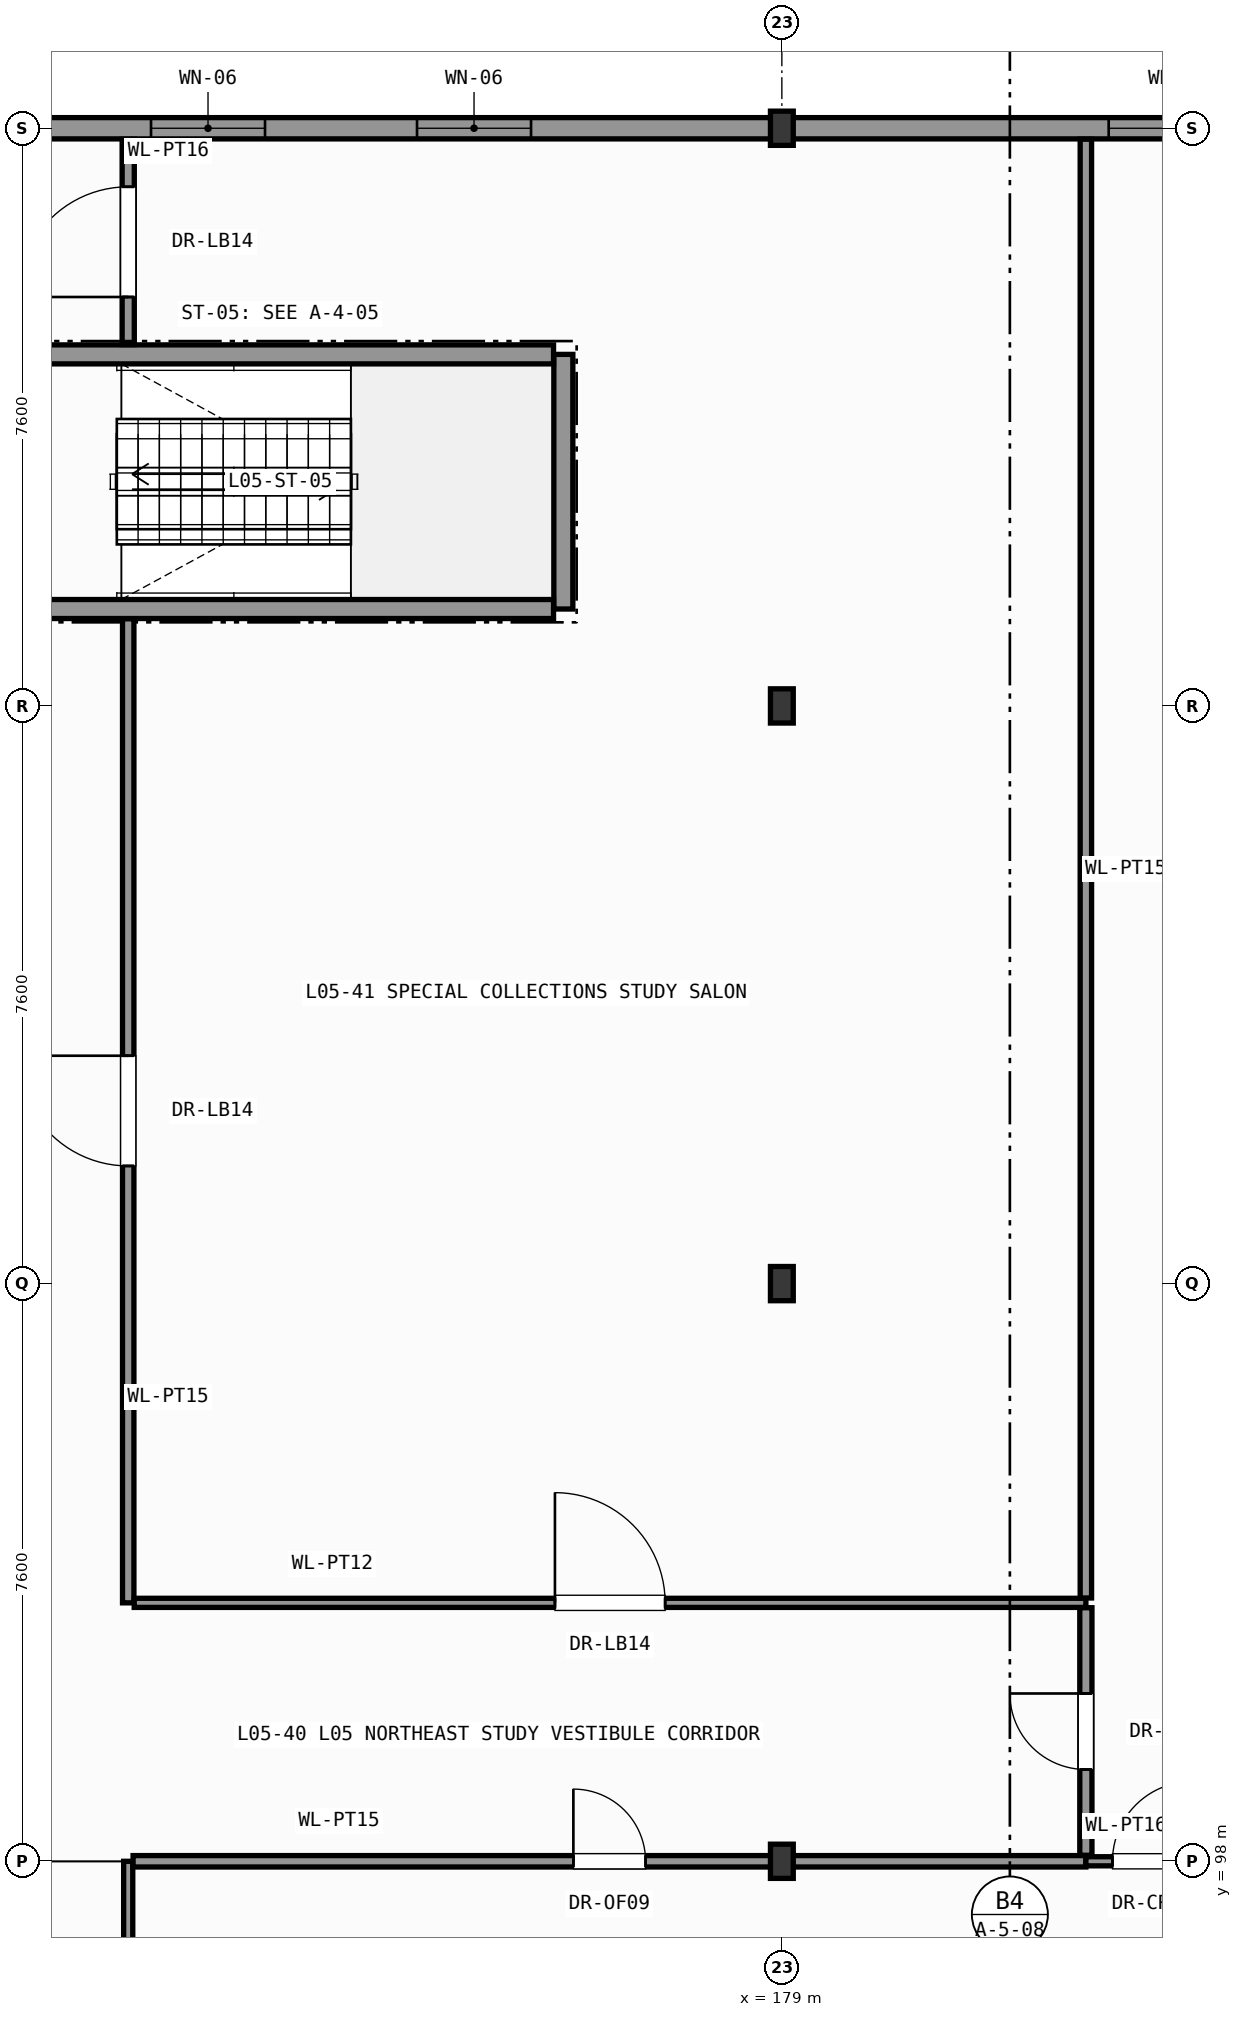
"""IFC4 building model, lengths in metres.
Left out: names, types, materials, properties, quantities, classifications, styles, units other than length and angle.
Written with IfcOpenShell. Run it as: python <this file> out.ifc"""

import sys

from ifc_helpers import new_model, si_unit, direction, frame, frame_2d, origin, origin_2d, place, context, subcontext, project, spatial, rectangle, i_section, extrude, element, fill, save


model = new_model("IFC4")
c1 = context("Model", 3, precision=1e-05, world=origin(), true_north=direction((0.0, 1.0)))
c2 = subcontext(c1, "Body", "Model", "MODEL_VIEW")
j1 = project(units=[si_unit("LENGTHUNIT", "METRE"), si_unit("PLANEANGLEUNIT", "RADIAN")], contexts=[c1])
p1 = place(None, origin())
s1 = spatial("IfcSite", under=j1, at=p1, CompositionType="ELEMENT")
p2 = place(p1, origin())
s2 = spatial("IfcBuilding", under=s1, at=p2, CompositionType="ELEMENT")
p3 = place(p2, frame((0.0, 0.0, 22.2)))
s3 = spatial("IfcBuildingStorey", under=s2, at=p3, CompositionType="ELEMENT", Elevation=22.2)
for number, where, z_axis, x_axis in (
    (1, (179.0, 98.0, 0.0), (0.0, 0.0, 1.0), (1.0, 0.0, 0.0)),
    (2, (179.0, 105.6, 0.0), (0.0, 0.0, 1.0), (1.0, 0.0, 0.0)),
    (3, (179.0, 113.2, 0.0), (0.0, 0.0, 1.0), (1.0, 0.0, 0.0)),
    (4, (179.0, 120.8, 0.0), (0.0, 0.0, 1.0), (1.0, 0.0, 0.0)),
):
    element("IfcColumn", number, at=place(p3, frame(where, z_axis=z_axis, x_axis=x_axis)), inside=s3, PredefinedType="COLUMN", context=c2, shape_type="SweptSolid", body=[
        extrude(i_section(OverallWidth=0.3, OverallDepth=0.45, WebThickness=0.014, FlangeThickness=0.026, FilletRadius=0.027, at=origin_2d()), origin(), (0.0, 0.0, 1.0), 4.2),
    ])
p4 = place(p3, frame((179.0, 120.8, 0.0), z_axis=(0.0, 0.0, 1.0), x_axis=(1.0, 0.0, 0.0)))
e5 = element("IfcWall", 5, at=p4, inside=s3, PredefinedType="SOLIDWALL", context=c2, shape_type="SweptSolid", body=[
    extrude(rectangle(XDim=12.966, YDim=0.28, at=frame_2d((6.483, 0.0))), origin(), (0.0, 0.0, 1.0), 3.415),
])
p5 = place(p4, frame((4.3, 0.0, 0.95)))
e6 = element("IfcOpeningElement", 6, at=p5, cuts=e5, PredefinedType="OPENING", context=c2, shape_type="SweptSolid", body=[
    extrude(rectangle(XDim=1.8, YDim=2.06, at=frame_2d((0.9, 1.03))), frame((0.0, 0.15, 0.0), z_axis=(0.0, -1.0, 0.0), x_axis=(1.0, 0.0, 0.0)), (0.0, 0.0, 1.0), 0.3),
])
p6 = place(p4, frame((7.7, 0.0, 0.95)))
e7 = element("IfcOpeningElement", 7, at=p6, cuts=e5, PredefinedType="OPENING", context=c2, shape_type="SweptSolid", body=[
    extrude(rectangle(XDim=1.8, YDim=2.06, at=frame_2d((0.9, 1.03))), frame((0.0, 0.15, 0.0), z_axis=(0.0, -1.0, 0.0), x_axis=(1.0, 0.0, 0.0)), (0.0, 0.0, 1.0), 0.3),
])
p7 = place(p3, frame((167.0, 120.8, 0.0), z_axis=(0.0, 0.0, 1.0), x_axis=(1.0, 0.0, 0.0)))
e8 = element("IfcWall", 8, at=p7, inside=s3, PredefinedType="SOLIDWALL", context=c2, shape_type="SweptSolid", body=[
    extrude(rectangle(XDim=12.0, YDim=0.28, at=frame_2d((6.0, 0.0))), origin(), (0.0, 0.0, 1.0), 3.415),
])
p8 = place(p7, frame((3.7, 0.0, 0.95)))
e9 = element("IfcOpeningElement", 9, at=p8, cuts=e8, PredefinedType="OPENING", context=c2, shape_type="SweptSolid", body=[
    extrude(rectangle(XDim=1.5, YDim=2.06, at=frame_2d((0.75, 1.03))), frame((0.0, 0.15, 0.0), z_axis=(0.0, -1.0, 0.0), x_axis=(1.0, 0.0, 0.0)), (0.0, 0.0, 1.0), 0.3),
])
p9 = place(p7, frame((7.2, 0.0, 0.95)))
e10 = element("IfcOpeningElement", 10, at=p9, cuts=e8, PredefinedType="OPENING", context=c2, shape_type="SweptSolid", body=[
    extrude(rectangle(XDim=1.5, YDim=2.06, at=frame_2d((0.75, 1.03))), frame((0.0, 0.15, 0.0), z_axis=(0.0, -1.0, 0.0), x_axis=(1.0, 0.0, 0.0)), (0.0, 0.0, 1.0), 0.3),
])
p10 = place(p3, frame((176.125, 114.475, 0.0), z_axis=(0.0, 0.0, 1.0), x_axis=(0.0, 1.0, 0.0)))
e11 = element("IfcWall", 11, at=p10, inside=s3, PredefinedType="SHEAR", context=c2, shape_type="SweptSolid", body=[
    extrude(rectangle(XDim=3.35, YDim=0.25, at=frame_2d((1.675, 0.0))), origin(), (0.0, 0.0, 1.0), 3.98),
])
for number, where, z_axis, x_axis in (
    (12, (168.804, 114.475, 0.0), (0.0, 0.0, 1.0), (1.0, 0.0, 0.0)),
    (13, (168.804, 117.825, 0.0), (0.0, 0.0, 1.0), (1.0, 0.0, 0.0)),
):
    element("IfcWall", number, at=place(p3, frame(where, z_axis=z_axis, x_axis=x_axis)), inside=s3, PredefinedType="SHEAR", context=c2, shape_type="SweptSolid", body=[
        extrude(rectangle(XDim=7.192, YDim=0.25, at=frame_2d((3.596, 0.0))), origin(), (0.0, 0.0, 1.0), 3.98),
    ])
p11 = place(p3, frame((170.4, 86.879, 0.0), z_axis=(0.0, 0.0, 1.0), x_axis=(0.0, 1.0, 0.0)))
e14 = element("IfcWall", 14, at=p11, inside=s3, PredefinedType="PARTITIONING", context=c2, shape_type="SweptSolid", body=[
    extrude(rectangle(XDim=11.121, YDim=0.12, at=frame_2d((5.561, 0.0))), origin(), (0.0, 0.0, 1.0), 3.98),
])
p12 = place(p11, frame((5.035, 0.0, 0.0)))
e15 = element("IfcOpeningElement", 15, at=p12, cuts=e14, PredefinedType="OPENING", context=c2, shape_type="SweptSolid", body=[
    extrude(rectangle(XDim=1.05, YDim=2.2, at=frame_2d((0.525, 1.1))), frame((0.0, 0.07, 0.0), z_axis=(0.0, -1.0, 0.0), x_axis=(1.0, 0.0, 0.0)), (0.0, 0.0, 1.0), 0.14),
])
p13 = place(p3, frame((170.464, 98.0, 0.0), z_axis=(0.0, 0.0, 1.0), x_axis=(1.0, 0.0, 0.0)))
e16 = element("IfcWall", 16, at=p13, inside=s3, PredefinedType="PARTITIONING", context=c2, shape_type="SweptSolid", body=[
    extrude(rectangle(XDim=12.536, YDim=0.15, at=frame_2d((6.268, 0.0))), origin(), (0.0, 0.0, 1.0), 3.415),
])
p14 = place(p13, frame((5.793, 0.0, 0.0)))
e17 = element("IfcOpeningElement", 17, at=p14, cuts=e16, PredefinedType="OPENING", context=c2, shape_type="SweptSolid", body=[
    extrude(rectangle(XDim=0.95, YDim=2.1, at=frame_2d((0.475, 1.05))), frame((0.0, 0.085, 0.0), z_axis=(0.0, -1.0, 0.0), x_axis=(1.0, 0.0, 0.0)), (0.0, 0.0, 1.0), 0.17),
])
p15 = place(p3, frame((183.0, 98.0, 0.0), z_axis=(0.0, 0.0, 1.0), x_axis=(1.0, 0.0, 0.0)))
e18 = element("IfcWall", 18, at=p15, inside=s3, PredefinedType="PARTITIONING", context=c2, shape_type="SweptSolid", body=[
    extrude(rectangle(XDim=14.821, YDim=0.12, at=frame_2d((7.411, 0.0))), origin(), (0.0, 0.0, 1.0), 3.315),
])
p16 = place(p15, frame((0.35, 0.0, 0.0)))
e19 = element("IfcOpeningElement", 19, at=p16, cuts=e18, PredefinedType="OPENING", context=c2, shape_type="SweptSolid", body=[
    extrude(rectangle(XDim=1.05, YDim=2.2, at=frame_2d((0.525, 1.1))), frame((0.0, 0.07, 0.0), z_axis=(0.0, -1.0, 0.0), x_axis=(1.0, 0.0, 0.0)), (0.0, 0.0, 1.0), 0.14),
])
p17 = place(p3, frame((170.4, 117.954, 0.0), z_axis=(0.0, 0.0, 1.0), x_axis=(0.0, 1.0, 0.0)))
e20 = element("IfcWall", 20, at=p17, inside=s3, PredefinedType="PARTITIONING", context=c2, shape_type="SweptSolid", body=[
    extrude(rectangle(XDim=2.702, YDim=0.16, at=frame_2d((1.351, 0.0))), origin(), (0.0, 0.0, 1.0), 3.98),
])
p18 = place(p17, frame((0.626, 0.0, 0.0)))
e21 = element("IfcOpeningElement", 21, at=p18, cuts=e20, PredefinedType="OPENING", context=c2, shape_type="SweptSolid", body=[
    extrude(rectangle(XDim=1.45, YDim=2.35, at=frame_2d((0.725, 1.175))), frame((0.0, 0.09, 0.0), z_axis=(0.0, -1.0, 0.0), x_axis=(1.0, 0.0, 0.0)), (0.0, 0.0, 1.0), 0.18),
])
p19 = place(p3, frame((170.4, 101.4, 0.0), z_axis=(0.0, 0.0, 1.0), x_axis=(0.0, 1.0, 0.0)))
e22 = element("IfcWall", 22, at=p19, inside=s3, PredefinedType="PARTITIONING", context=c2, shape_type="SweptSolid", body=[
    extrude(rectangle(XDim=12.946, YDim=0.15, at=frame_2d((6.473, 0.0))), origin(), (0.0, 0.0, 1.0), 3.98),
])
p20 = place(p19, frame((5.748, 0.0, 0.0)))
e23 = element("IfcOpeningElement", 23, at=p20, cuts=e22, PredefinedType="OPENING", context=c2, shape_type="SweptSolid", body=[
    extrude(rectangle(XDim=1.45, YDim=2.35, at=frame_2d((0.725, 1.175))), frame((0.0, 0.085, 0.0), z_axis=(0.0, -1.0, 0.0), x_axis=(1.0, 0.0, 0.0)), (0.0, 0.0, 1.0), 0.17),
])
p21 = place(p3, frame((170.479, 101.4, 0.0), z_axis=(0.0, 0.0, 1.0), x_axis=(1.0, 0.0, 0.0)))
e24 = element("IfcWall", 24, at=p21, inside=s3, PredefinedType="PARTITIONING", context=c2, shape_type="SweptSolid", body=[
    extrude(rectangle(XDim=12.521, YDim=0.12, at=frame_2d((6.26, 0.0))), origin(), (0.0, 0.0, 1.0), 3.98),
])
p22 = place(p21, frame((5.535, 0.0, 0.0)))
e25 = element("IfcOpeningElement", 25, at=p22, cuts=e24, PredefinedType="OPENING", context=c2, shape_type="SweptSolid", body=[
    extrude(rectangle(XDim=1.45, YDim=2.35, at=frame_2d((0.725, 1.175))), frame((0.0, 0.07, 0.0), z_axis=(0.0, -1.0, 0.0), x_axis=(1.0, 0.0, 0.0)), (0.0, 0.0, 1.0), 0.14),
])
p23 = place(p3, frame((183.0, 98.079, 0.0), z_axis=(0.0, 0.0, 1.0), x_axis=(0.0, 1.0, 0.0)))
e26 = element("IfcWall", 26, at=p23, inside=s3, PredefinedType="PARTITIONING", context=c2, shape_type="SweptSolid", body=[
    extrude(rectangle(XDim=3.257, YDim=0.16, at=frame_2d((1.628, 0.0))), origin(), (0.0, 0.0, 1.0), 3.98),
])
p24 = place(p23, frame((1.128, 0.0, 0.0)))
e27 = element("IfcOpeningElement", 27, at=p24, cuts=e26, PredefinedType="OPENING", context=c2, shape_type="SweptSolid", body=[
    extrude(rectangle(XDim=1.0, YDim=2.15, at=frame_2d((0.5, 1.075))), frame((0.0, 0.09, 0.0), z_axis=(0.0, -1.0, 0.0), x_axis=(1.0, 0.0, 0.0)), (0.0, 0.0, 1.0), 0.18),
])
p25 = place(p3, frame((183.0, 101.464, 0.0), z_axis=(0.0, 0.0, 1.0), x_axis=(0.0, 1.0, 0.0)))
e28 = element("IfcWall", 28, at=p25, inside=s3, PredefinedType="PARTITIONING", context=c2, shape_type="SweptSolid", body=[
    extrude(rectangle(XDim=19.192, YDim=0.15, at=frame_2d((9.596, 0.0))), origin(), (0.0, 0.0, 1.0), 3.98),
])
p26 = place(p5, origin())
e29 = element("IfcWindow", 29, at=p26, inside=s3, PartitioningType="SINGLE_PANEL", PredefinedType="WINDOW", context=c2, shape_type="SweptSolid", body=[
    extrude(rectangle(XDim=1.8, YDim=2.06, at=frame_2d((0.9, 1.03))), frame((0.0, 0.03, 0.0), z_axis=(0.0, -1.0, 0.0), x_axis=(1.0, 0.0, 0.0)), (0.0, 0.0, 1.0), 0.06),
])
fill(e6, e29)
p27 = place(p8, origin())
e30 = element("IfcWindow", 30, at=p27, inside=s3, PartitioningType="SINGLE_PANEL", PredefinedType="WINDOW", context=c2, shape_type="SweptSolid", body=[
    extrude(rectangle(XDim=1.5, YDim=2.06, at=frame_2d((0.75, 1.03))), frame((0.0, 0.03, 0.0), z_axis=(0.0, -1.0, 0.0), x_axis=(1.0, 0.0, 0.0)), (0.0, 0.0, 1.0), 0.06),
])
fill(e9, e30)
p28 = place(p9, origin())
e31 = element("IfcWindow", 31, at=p28, inside=s3, PartitioningType="SINGLE_PANEL", PredefinedType="WINDOW", context=c2, shape_type="SweptSolid", body=[
    extrude(rectangle(XDim=1.5, YDim=2.06, at=frame_2d((0.75, 1.03))), frame((0.0, 0.03, 0.0), z_axis=(0.0, -1.0, 0.0), x_axis=(1.0, 0.0, 0.0)), (0.0, 0.0, 1.0), 0.06),
])
fill(e10, e31)
p29 = place(p14, origin())
e32 = element("IfcDoor", 32, at=p29, inside=s3, OperationType="SINGLE_SWING_LEFT", PredefinedType="DOOR", context=c2, shape_type="SweptSolid", body=[
    extrude(rectangle(XDim=0.95, YDim=2.1, at=frame_2d((0.475, 1.05))), frame((0.0, 0.025, 0.0), z_axis=(0.0, -1.0, 0.0), x_axis=(1.0, 0.0, 0.0)), (0.0, 0.0, 1.0), 0.05),
])
fill(e17, e32)
p30 = place(p16, origin())
e33 = element("IfcDoor", 33, at=p30, inside=s3, OperationType="SINGLE_SWING_RIGHT", PredefinedType="DOOR", context=c2, shape_type="SweptSolid", body=[
    extrude(rectangle(XDim=1.05, YDim=2.2, at=frame_2d((0.525, 1.1))), frame((0.0, 0.025, 0.0), z_axis=(0.0, -1.0, 0.0), x_axis=(1.0, 0.0, 0.0)), (0.0, 0.0, 1.0), 0.05),
])
fill(e19, e33)
p31 = place(p18, origin())
e34 = element("IfcDoor", 34, at=p31, inside=s3, OperationType="SINGLE_SWING_LEFT", PredefinedType="DOOR", context=c2, shape_type="SweptSolid", body=[
    extrude(rectangle(XDim=1.45, YDim=2.35, at=frame_2d((0.725, 1.175))), frame((0.0, 0.025, 0.0), z_axis=(0.0, -1.0, 0.0), x_axis=(1.0, 0.0, 0.0)), (0.0, 0.0, 1.0), 0.05),
])
fill(e21, e34)
p32 = place(p20, origin())
e35 = element("IfcDoor", 35, at=p32, inside=s3, OperationType="SINGLE_SWING_RIGHT", PredefinedType="DOOR", context=c2, shape_type="SweptSolid", body=[
    extrude(rectangle(XDim=1.45, YDim=2.35, at=frame_2d((0.725, 1.175))), frame((0.0, 0.025, 0.0), z_axis=(0.0, -1.0, 0.0), x_axis=(1.0, 0.0, 0.0)), (0.0, 0.0, 1.0), 0.05),
])
fill(e23, e35)
p33 = place(p22, origin())
e36 = element("IfcDoor", 36, at=p33, inside=s3, OperationType="SINGLE_SWING_LEFT", PredefinedType="DOOR", context=c2, shape_type="SweptSolid", body=[
    extrude(rectangle(XDim=1.45, YDim=2.35, at=frame_2d((0.725, 1.175))), frame((0.0, 0.025, 0.0), z_axis=(0.0, -1.0, 0.0), x_axis=(1.0, 0.0, 0.0)), (0.0, 0.0, 1.0), 0.05),
])
fill(e25, e36)
p34 = place(p24, origin())
e37 = element("IfcDoor", 37, at=p34, inside=s3, OperationType="SINGLE_SWING_RIGHT", PredefinedType="DOOR", context=c2, shape_type="SweptSolid", body=[
    extrude(rectangle(XDim=1.0, YDim=2.15, at=frame_2d((0.5, 1.075))), frame((0.0, 0.025, 0.0), z_axis=(0.0, -1.0, 0.0), x_axis=(1.0, 0.0, 0.0)), (0.0, 0.0, 1.0), 0.05),
])
fill(e27, e37)
save(model, sys.argv[1])
